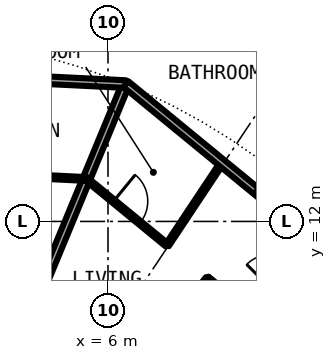
"""IFC4 building model, lengths in metres.
Left out: names, types, materials, properties, quantities, classifications, styles, units other than length and angle.
Written with IfcOpenShell. Run it as: python <this file> out.ifc"""

import sys

from ifc_helpers import new_model, si_unit, direction, frame, frame_2d, origin, place, context, subcontext, project, spatial, rectangle, extrude, element, fill, save


model = new_model("IFC4")
c1 = context("Model", 3, precision=1e-05, world=origin(), true_north=direction((0.0, 1.0)))
c2 = subcontext(c1, "Body", "Model", "MODEL_VIEW")
j1 = project(units=[si_unit("LENGTHUNIT", "METRE"), si_unit("PLANEANGLEUNIT", "RADIAN")], contexts=[c1])
p1 = place(None, origin())
s1 = spatial("IfcSite", under=j1, at=p1, CompositionType="ELEMENT")
p2 = place(p1, origin())
s2 = spatial("IfcBuilding", under=s1, at=p2, CompositionType="ELEMENT")
p3 = place(p2, frame((0.0, 0.0, 81.9)))
s3 = spatial("IfcBuildingStorey", under=s2, at=p3, CompositionType="ELEMENT", Elevation=81.9)
p4 = place(p3, frame((2.955, 7.132, 0.0), z_axis=(0.0, 0.0, 1.0), x_axis=(0.382556139466, 0.923932248683, 0.0)))
e1 = element("IfcWall", 1, at=p4, inside=s3, PredefinedType="PARTITIONING", context=c2, shape_type="SweptSolid", body=[
    extrude(rectangle(XDim=9.18, YDim=0.2, at=frame_2d((4.59, 0.0))), origin(), (0.0, 0.0, 1.0), 2.7),
])
p5 = place(p3, frame((4.898, 5.968, 0.0), z_axis=(0.0, 0.0, 1.0), x_axis=(0.634358693064, 0.773038840249, 0.0)))
e2 = element("IfcWall", 2, at=p5, inside=s3, PredefinedType="PARTITIONING", context=c2, shape_type="SweptSolid", body=[
    extrude(rectangle(XDim=5.868, YDim=0.1, at=frame_2d((2.934, 0.0))), origin(), (0.0, 0.0, 1.0), 2.7),
])
p6 = place(p5, frame((2.484, 0.0, 0.0)))
e3 = element("IfcOpeningElement", 3, at=p6, cuts=e2, PredefinedType="OPENING", context=c2, shape_type="SweptSolid", body=[
    extrude(rectangle(XDim=0.9, YDim=2.3, at=frame_2d((0.45, 1.15))), frame((0.0, 0.06, 0.0), z_axis=(0.0, -1.0, 0.0), x_axis=(1.0, 0.0, 0.0)), (0.0, 0.0, 1.0), 0.12),
])
p7 = place(p3, frame((7.558, 11.376, 0.0), z_axis=(0.0, 0.0, 1.0), x_axis=(0.553615197403, 0.83277260594, 0.0)))
e4 = element("IfcWall", 4, at=p7, inside=s3, PredefinedType="PARTITIONING", context=c2, shape_type="SweptSolid", body=[
    extrude(rectangle(XDim=2.597, YDim=0.1, at=frame_2d((1.299, 0.0))), origin(), (0.0, 0.0, 1.0), 2.7),
])
p8 = place(p3, frame((9.683, 9.632, 0.0), z_axis=(0.0, 0.0, 1.0), x_axis=(0.708796844581, 0.705412668665, 0.0)))
e5 = element("IfcWall", 5, at=p8, inside=s3, PredefinedType="PARTITIONING", context=c2, shape_type="SweptSolid", body=[
    extrude(rectangle(XDim=2.597, YDim=0.1, at=frame_2d((1.299, 0.0))), origin(), (0.0, 0.0, 1.0), 2.7),
])
p9 = place(p8, frame((0.849, 0.0, 0.0)))
e6 = element("IfcOpeningElement", 6, at=p9, cuts=e5, PredefinedType="OPENING", context=c2, shape_type="SweptSolid", body=[
    extrude(rectangle(XDim=0.9, YDim=2.3, at=frame_2d((0.45, 1.15))), frame((0.0, 0.06, 0.0), z_axis=(0.0, -1.0, 0.0), x_axis=(1.0, 0.0, 0.0)), (0.0, 0.0, 1.0), 0.12),
])
p10 = place(p3, frame((1.344, 13.319, 0.0), z_axis=(0.0, 0.0, 1.0), x_axis=(0.998772010578, -0.049542616872, 0.0)))
e7 = element("IfcWall", 7, at=p10, inside=s3, PredefinedType="PARTITIONING", context=c2, shape_type="SweptSolid", body=[
    extrude(rectangle(XDim=4.1, YDim=0.1, at=frame_2d((2.05, 0.0))), origin(), (0.0, 0.0, 1.0), 2.7),
])
p11 = place(p3, frame((5.427, 13.121, 0.0), z_axis=(0.0, 0.0, 1.0), x_axis=(0.773323547924, -0.634011585246, 0.0)))
e8 = element("IfcWall", 8, at=p11, inside=s3, PredefinedType="PARTITIONING", context=c2, shape_type="SweptSolid", body=[
    extrude(rectangle(XDim=2.748, YDim=0.1, at=frame_2d((1.374, 0.0))), origin(), (0.0, 0.0, 1.0), 2.7),
])
p12 = place(p11, frame((0.93, 0.0, 0.0)))
e9 = element("IfcOpeningElement", 9, at=p12, cuts=e8, PredefinedType="OPENING", context=c2, shape_type="SweptSolid", body=[
    extrude(rectangle(XDim=0.9, YDim=2.3, at=frame_2d((0.45, 1.15))), frame((0.0, 0.06, 0.0), z_axis=(0.0, -1.0, 0.0), x_axis=(1.0, 0.0, 0.0)), (0.0, 0.0, 1.0), 0.12),
])
p13 = place(p3, frame((8.614, 10.509, 0.0), z_axis=(0.0, 0.0, 1.0), x_axis=(0.772957368531, -0.6344579627, 0.0)))
e10 = element("IfcWall", 10, at=p13, inside=s3, PredefinedType="PARTITIONING", context=c2, shape_type="SweptSolid", body=[
    extrude(rectangle(XDim=1.906, YDim=0.1, at=frame_2d((0.953, 0.0))), origin(), (0.0, 0.0, 1.0), 2.7),
])
p14 = place(p3, frame((-4.903, 16.172, 0.0), z_axis=(0.0, 0.0, 1.0), x_axis=(0.998797695979, -0.049022061427, 0.0)))
e11 = element("IfcWall", 11, at=p14, inside=s3, PredefinedType="PARTITIONING", context=c2, shape_type="SweptSolid", body=[
    extrude(rectangle(XDim=11.385, YDim=0.2, at=frame_2d((5.692, 0.0))), origin(), (0.0, 0.0, 1.0), 2.7),
])
p15 = place(p14, frame((4.376, 0.0, 0.0)))
e12 = element("IfcOpeningElement", 12, at=p15, cuts=e11, PredefinedType="OPENING", context=c2, shape_type="SweptSolid", body=[
    extrude(rectangle(XDim=1.0, YDim=2.3, at=frame_2d((0.5, 1.15))), frame((0.0, 0.11, 0.0), z_axis=(0.0, -1.0, 0.0), x_axis=(1.0, 0.0, 0.0)), (0.0, 0.0, 1.0), 0.22),
])
p16 = place(p3, frame((6.47, 15.613, 0.0), z_axis=(0.0, 0.0, 1.0), x_axis=(0.77292501819, -0.634497372931, 0.0)))
e13 = element("IfcWall", 13, at=p16, inside=s3, PredefinedType="PARTITIONING", context=c2, shape_type="SweptSolid", body=[
    extrude(rectangle(XDim=9.81, YDim=0.2, at=frame_2d((4.905, 0.0))), origin(), (0.0, 0.0, 1.0), 2.7),
])
p17 = place(p16, frame((4.404, 0.0, 0.0)))
e14 = element("IfcOpeningElement", 14, at=p17, cuts=e13, PredefinedType="OPENING", context=c2, shape_type="SweptSolid", body=[
    extrude(rectangle(XDim=1.0, YDim=2.3, at=frame_2d((0.5, 1.15))), frame((0.0, 0.11, 0.0), z_axis=(0.0, -1.0, 0.0), x_axis=(1.0, 0.0, 0.0)), (0.0, 0.0, 1.0), 0.22),
])
p18 = place(p3, frame((9.239, 17.286, 0.0), z_axis=(0.0, 0.0, 1.0), x_axis=(0.740909940942, -0.671604392044, 0.0)))
e15 = element("IfcWall", 15, at=p18, inside=s3, PredefinedType="PARTITIONING", context=c2, shape_type="SweptSolid", body=[
    extrude(rectangle(XDim=9.367, YDim=0.2, at=frame_2d((4.683, 0.0))), origin(), (0.0, 0.0, 1.0), 2.38),
])
p19 = place(p18, frame((3.731, 0.0, 0.0)))
e16 = element("IfcOpeningElement", 16, at=p19, cuts=e15, PredefinedType="OPENING", context=c2, shape_type="SweptSolid", body=[
    extrude(rectangle(XDim=1.0, YDim=2.3, at=frame_2d((0.5, 1.15))), frame((0.0, 0.11, 0.0), z_axis=(0.0, -1.0, 0.0), x_axis=(1.0, 0.0, 0.0)), (0.0, 0.0, 1.0), 0.22),
])
p20 = place(p17, origin())
e17 = element("IfcDoor", 17, at=p20, inside=s3, OperationType="SINGLE_SWING_LEFT", PredefinedType="DOOR", context=c2, shape_type="SweptSolid", body=[
    extrude(rectangle(XDim=1.0, YDim=2.3, at=frame_2d((0.5, 1.15))), frame((0.0, 0.025, 0.0), z_axis=(0.0, -1.0, 0.0), x_axis=(1.0, 0.0, 0.0)), (0.0, 0.0, 1.0), 0.05),
])
fill(e14, e17)
p21 = place(p12, origin())
e18 = element("IfcDoor", 18, at=p21, inside=s3, OperationType="SINGLE_SWING_RIGHT", PredefinedType="DOOR", context=c2, shape_type="SweptSolid", body=[
    extrude(rectangle(XDim=0.9, YDim=2.3, at=frame_2d((0.45, 1.15))), frame((0.0, 0.025, 0.0), z_axis=(0.0, -1.0, 0.0), x_axis=(1.0, 0.0, 0.0)), (0.0, 0.0, 1.0), 0.05),
])
fill(e9, e18)
save(model, sys.argv[1])
